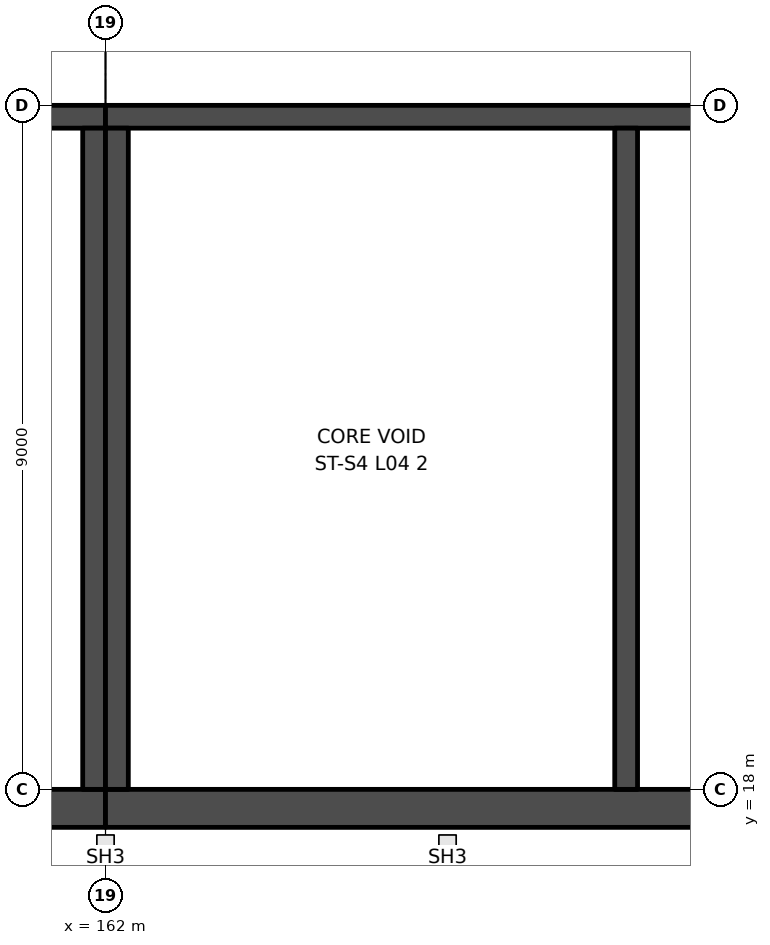
"""IFC4 building model, lengths in metres.
Left out: names, types, materials, properties, quantities, classifications, styles, units other than length and angle.
Written with IfcOpenShell. Run it as: python <this file> out.ifc"""

import sys

from ifc_helpers import new_model, si_unit, direction, frame, frame_2d, origin, place, context, subcontext, project, spatial, rectangle, extrude, element, save


model = new_model("IFC4")
c1 = context("Model", 3, precision=1e-05, world=origin(), true_north=direction((0.0, 1.0)))
c2 = subcontext(c1, "Body", "Model", "MODEL_VIEW")
j1 = project(units=[si_unit("LENGTHUNIT", "METRE"), si_unit("PLANEANGLEUNIT", "RADIAN")], contexts=[c1])
p1 = place(None, origin())
s1 = spatial("IfcSite", under=j1, at=p1, CompositionType="ELEMENT")
p2 = place(p1, origin())
s2 = spatial("IfcBuilding", under=s1, at=p2, CompositionType="ELEMENT")
p3 = place(p2, frame((0.0, 0.0, 28.0)))
s3 = spatial("IfcBuildingStorey", under=s2, at=p3, CompositionType="ELEMENT", Elevation=28.0)
p4 = place(p3, frame((144.0, 26.85, 0.0), z_axis=(0.0, 0.0, 1.0), x_axis=(1.0, 0.0, 0.0)))
e1 = element("IfcWall", 1, at=p4, inside=s3, PredefinedType="SHEAR", context=c2, shape_type="SweptSolid", body=[
    extrude(rectangle(XDim=18.0, YDim=0.3, at=frame_2d((9.0, 0.0))), origin(), (0.0, 0.0, 1.0), 5.5),
])
p5 = place(p4, frame((1.5, 0.0, 0.0)))
e2 = element("IfcOpeningElement", 2, at=p5, cuts=e1, PredefinedType="OPENING", context=c2, shape_type="SweptSolid", body=[
    extrude(rectangle(XDim=1.2, YDim=2.1, at=frame_2d((0.6, 1.05))), frame((0.0, 0.16, 0.0), z_axis=(0.0, -1.0, 0.0), x_axis=(1.0, 0.0, 0.0)), (0.0, 0.0, 1.0), 0.32),
])
p6 = place(p3, frame((144.0, 17.75, 0.0), z_axis=(0.0, 0.0, 1.0), x_axis=(1.0, 0.0, 0.0)))
e3 = element("IfcWall", 3, at=p6, inside=s3, PredefinedType="SHEAR", context=c2, shape_type="SweptSolid", body=[
    extrude(rectangle(XDim=18.0, YDim=0.5, at=frame_2d((9.0, 0.0))), origin(), (0.0, 0.0, 1.0), 5.5),
])
p7 = place(p3, frame((161.85, 26.7, 0.0), z_axis=(0.0, 0.0, 1.0), x_axis=(0.0, -1.0, 0.0)))
e4 = element("IfcWall", 4, at=p7, inside=s3, PredefinedType="SHEAR", context=c2, shape_type="SweptSolid", body=[
    extrude(rectangle(XDim=8.7, YDim=0.3, at=frame_2d((4.35, 0.0))), origin(), (0.0, 0.0, 1.0), 5.5),
])
p8 = place(p3, frame((180.0, 26.85, 0.0), z_axis=(0.0, 0.0, 1.0), x_axis=(-1.0, 0.0, 0.0)))
e5 = element("IfcWall", 5, at=p8, inside=s3, PredefinedType="SHEAR", context=c2, shape_type="SweptSolid", body=[
    extrude(rectangle(XDim=18.0, YDim=0.3, at=frame_2d((9.0, 0.0))), origin(), (0.0, 0.0, 1.0), 5.5),
])
p9 = place(p8, frame((8.6, 0.0, 0.0)))
e6 = element("IfcOpeningElement", 6, at=p9, cuts=e5, PredefinedType="OPENING", context=c2, shape_type="SweptSolid", body=[
    extrude(rectangle(XDim=1.2, YDim=2.1, at=frame_2d((0.6, 1.05))), frame((0.0, 0.16, 0.0), z_axis=(0.0, -1.0, 0.0), x_axis=(1.0, 0.0, 0.0)), (0.0, 0.0, 1.0), 0.32),
])
p10 = place(p3, frame((180.0, 17.75, 0.0), z_axis=(0.0, 0.0, 1.0), x_axis=(-1.0, 0.0, 0.0)))
e7 = element("IfcWall", 7, at=p10, inside=s3, PredefinedType="SHEAR", context=c2, shape_type="SweptSolid", body=[
    extrude(rectangle(XDim=18.0, YDim=0.5, at=frame_2d((9.0, 0.0))), origin(), (0.0, 0.0, 1.0), 5.5),
])
for number, where, z_axis, x_axis in (
    (8, (162.15, 26.7, 0.0), (0.0, 0.0, 1.0), (0.0, -1.0, 0.0)),
    (9, (168.85, 26.7, 0.0), (0.0, 0.0, 1.0), (0.0, -1.0, 0.0)),
):
    element("IfcWall", number, at=place(p3, frame(where, z_axis=z_axis, x_axis=x_axis)), inside=s3, PredefinedType="SHEAR", context=c2, shape_type="SweptSolid", body=[
        extrude(rectangle(XDim=8.7, YDim=0.3, at=frame_2d((4.35, 0.0))), origin(), (0.0, 0.0, 1.0), 5.5),
    ])
save(model, sys.argv[1])
